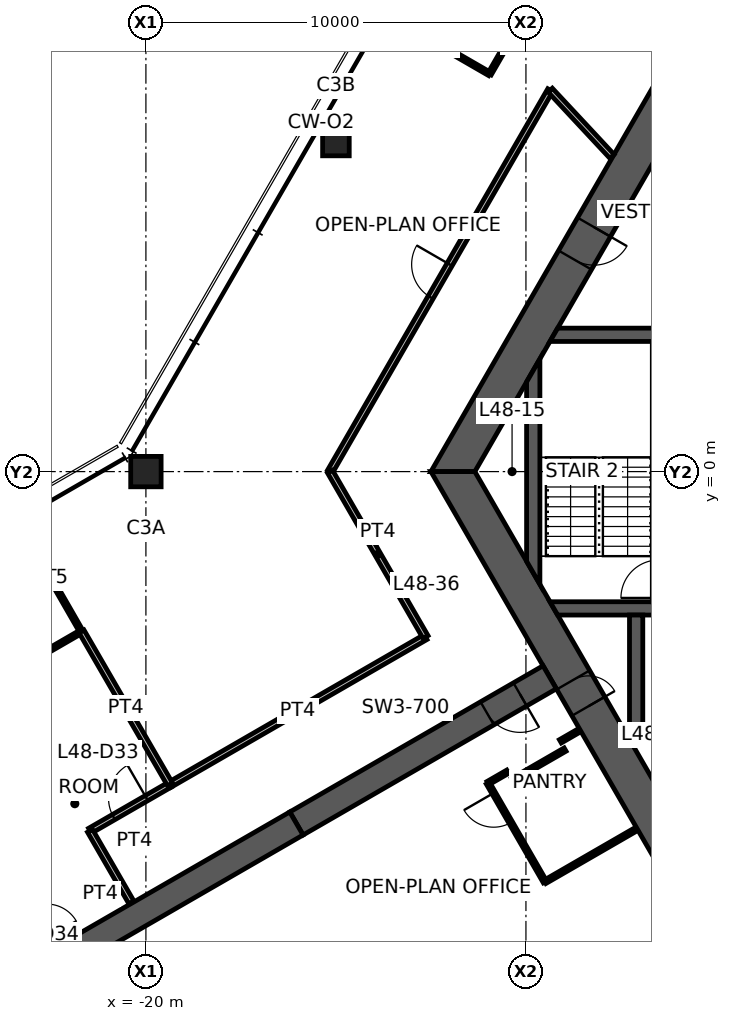
"""IFC4 building model, lengths in metres.
Left out: names, types, materials, properties, quantities, classifications, styles, units other than length and angle.
Written with IfcOpenShell. Run it as: python <this file> out.ifc"""

import sys

from ifc_helpers import new_model, si_unit, direction, frame, frame_2d, origin, origin_2d, place, context, subcontext, project, spatial, polyline, rectangle, hollow_rectangle, outline, extrude, element, fill, save


model = new_model("IFC4")
c1 = context("Model", 3, precision=1e-05, world=origin(), true_north=direction((0.0, 1.0)))
c2 = subcontext(c1, "Body", "Model", "MODEL_VIEW")
j1 = project(units=[si_unit("LENGTHUNIT", "METRE"), si_unit("PLANEANGLEUNIT", "RADIAN")], contexts=[c1])
p1 = place(None, origin())
s1 = spatial("IfcSite", under=j1, at=p1, CompositionType="ELEMENT")
p2 = place(p1, origin())
s2 = spatial("IfcBuilding", under=s1, at=p2, CompositionType="ELEMENT")
p3 = place(p2, frame((0.0, 0.0, 191.6)))
s3 = spatial("IfcBuildingStorey", under=s2, at=p3, CompositionType="ELEMENT", Elevation=191.6)
p4 = place(p3, frame((-20.0, 0.0, 0.0), z_axis=(0.0, 0.0, 1.0), x_axis=(1.0, 0.0, 0.0)))
e1 = element("IfcColumn", 1, at=p4, inside=s3, PredefinedType="COLUMN", context=c2, shape_type="SweptSolid", body=[
    extrude(hollow_rectangle(XDim=0.8, YDim=0.8, WallThickness=0.045, at=origin_2d()), origin(), (0.0, 0.0, 1.0), 3.9),
])
p5 = place(p3, frame((-15.0, 8.66, 0.0), z_axis=(0.0, 0.0, 1.0), x_axis=(1.0, 0.0, 0.0)))
e2 = element("IfcColumn", 2, at=p5, inside=s3, PredefinedType="COLUMN", context=c2, shape_type="SweptSolid", body=[
    extrude(hollow_rectangle(XDim=0.7, YDim=0.7, WallThickness=0.036, at=origin_2d()), origin(), (0.0, 0.0, 1.0), 3.9),
])
p6 = place(p3, frame((-5.961, 10.325, 0.0), z_axis=(0.0, 0.0, 1.0), x_axis=(-0.500004296715, -0.866022923061, 0.0)))
e3 = element("IfcWall", 3, at=p6, inside=s3, PredefinedType="SHEAR", context=c2, shape_type="SweptSolid", body=[
    extrude(outline(polyline([(-0.289, -0.5), (4.494, -0.5), (5.494, -0.5), (12.211, -0.5), (11.634, 0.5), (5.494, 0.5), (4.494, 0.5), (0.289, 0.5), (-0.289, -0.5)])), origin(), (0.0, 0.0, 1.0), 3.9),
])
p7 = place(p6, frame((4.494, 0.0, 0.0)))
e4 = element("IfcOpeningElement", 4, at=p7, cuts=e3, PredefinedType="OPENING", context=c2, shape_type="SweptSolid", body=[
    extrude(rectangle(XDim=1.0, YDim=2.1, at=frame_2d((0.5, 1.05))), frame((0.0, 0.51, 0.0), z_axis=(0.0, -1.0, 0.0), x_axis=(1.0, 0.0, 0.0)), (0.0, 0.0, 1.0), 1.02),
])
p8 = place(p3, frame((-11.922, 0.0, 0.0), z_axis=(0.0, 0.0, 1.0), x_axis=(0.500004296715, -0.866022923061, 0.0)))
e5 = element("IfcWall", 5, at=p8, inside=s3, PredefinedType="SHEAR", context=c2, shape_type="SweptSolid", body=[
    extrude(outline(polyline([(-0.289, -0.5), (6.331, -0.5), (7.131, -0.5), (12.211, -0.5), (11.634, 0.5), (7.131, 0.5), (6.331, 0.5), (0.289, 0.5), (-0.289, -0.5)])), origin(), (0.0, 0.0, 1.0), 3.9),
])
p9 = place(p8, frame((6.331, 0.0, 0.0)))
e6 = element("IfcOpeningElement", 6, at=p9, cuts=e5, PredefinedType="OPENING", context=c2, shape_type="SweptSolid", body=[
    extrude(rectangle(XDim=0.8, YDim=2.1, at=frame_2d((0.4, 1.05))), frame((0.0, 0.51, 0.0), z_axis=(0.0, -1.0, 0.0), x_axis=(1.0, 0.0, 0.0)), (0.0, 0.0, 1.0), 1.02),
])
p10 = place(p3, frame((-9.375, -5.413, 0.0), z_axis=(0.0, 0.0, 1.0), x_axis=(-0.866032377459, -0.499987921047, 0.0)))
e7 = element("IfcWall", 7, at=p10, inside=s3, PredefinedType="SHEAR", context=c2, shape_type="SweptSolid", body=[
    extrude(rectangle(XDim=7.696, YDim=0.7, at=frame_2d((3.848, 0.0))), origin(), (0.0, 0.0, 1.0), 3.9),
])
p11 = place(p10, frame((0.9, 0.0, 0.0)))
e8 = element("IfcOpeningElement", 8, at=p11, cuts=e7, PredefinedType="OPENING", context=c2, shape_type="SweptSolid", body=[
    extrude(rectangle(XDim=1.0, YDim=2.1, at=frame_2d((0.5, 1.05))), frame((0.0, 0.36, 0.0), z_axis=(0.0, -1.0, 0.0), x_axis=(1.0, 0.0, 0.0)), (0.0, 0.0, 1.0), 0.72),
])
p12 = place(p3, frame((-16.039, -9.26, 0.0), z_axis=(0.0, 0.0, 1.0), x_axis=(-0.866024837091, -0.50000098154, 0.0)))
e9 = element("IfcWall", 9, at=p12, inside=s3, PredefinedType="SHEAR", context=c2, shape_type="SweptSolid", body=[
    extrude(rectangle(XDim=13.0, YDim=0.7, at=frame_2d((6.5, 0.0))), origin(), (0.0, 0.0, 1.0), 3.9),
])
p13 = place(p3, frame((-9.266, 3.6, 0.0), z_axis=(0.0, 0.0, 1.0), x_axis=(1.0, 0.0, 0.0)))
e10 = element("IfcWall", 10, at=p13, inside=s3, PredefinedType="SHEAR", context=c2, shape_type="SweptSolid", body=[
    extrude(outline(polyline([(-0.101, -0.175), (3.266, -0.175), (4.266, -0.175), (5.667, -0.175), (6.767, -0.175), (7.841, -0.175), (7.841, 0.175), (6.767, 0.175), (5.667, 0.175), (4.266, 0.175), (3.266, 0.175), (0.101, 0.175), (-0.101, -0.175)])), origin(), (0.0, 0.0, 1.0), 3.9),
])
p14 = place(p13, frame((3.266, 0.0, 0.0)))
e11 = element("IfcOpeningElement", 11, at=p14, cuts=e10, PredefinedType="OPENING", context=c2, shape_type="SweptSolid", body=[
    extrude(rectangle(XDim=1.0, YDim=2.1, at=frame_2d((0.5, 1.05))), frame((0.0, 0.185, 0.0), z_axis=(0.0, -1.0, 0.0), x_axis=(1.0, 0.0, 0.0)), (0.0, 0.0, 1.0), 0.37),
])
p15 = place(p13, frame((5.667, 0.0, 0.0)))
e12 = element("IfcOpeningElement", 12, at=p15, cuts=e10, PredefinedType="OPENING", context=c2, shape_type="SweptSolid", body=[
    extrude(rectangle(XDim=1.1, YDim=2.1, at=frame_2d((0.55, 1.05))), frame((0.0, 0.185, 0.0), z_axis=(0.0, -1.0, 0.0), x_axis=(1.0, 0.0, 0.0)), (0.0, 0.0, 1.0), 0.37),
])
p16 = place(p3, frame((-9.266, -3.6, 0.0), z_axis=(0.0, 0.0, 1.0), x_axis=(1.0, 0.0, 0.0)))
e13 = element("IfcWall", 13, at=p16, inside=s3, PredefinedType="SHEAR", context=c2, shape_type="SweptSolid", body=[
    extrude(outline(polyline([(0.101, -0.175), (3.116, -0.175), (4.417, -0.175), (5.667, -0.175), (6.767, -0.175), (7.841, -0.175), (7.841, 0.175), (6.767, 0.175), (5.667, 0.175), (4.417, 0.175), (3.116, 0.175), (-0.101, 0.175), (0.101, -0.175)])), origin(), (0.0, 0.0, 1.0), 3.9),
])
p17 = place(p16, frame((5.667, 0.0, 0.0)))
e14 = element("IfcOpeningElement", 14, at=p17, cuts=e13, PredefinedType="OPENING", context=c2, shape_type="SweptSolid", body=[
    extrude(rectangle(XDim=1.1, YDim=2.1, at=frame_2d((0.55, 1.05))), frame((0.0, 0.185, 0.0), z_axis=(0.0, -1.0, 0.0), x_axis=(1.0, 0.0, 0.0)), (0.0, 0.0, 1.0), 0.37),
])
p18 = place(p16, frame((3.116, 0.0, 0.0)))
e15 = element("IfcOpeningElement", 15, at=p18, cuts=e13, PredefinedType="OPENING", context=c2, shape_type="SweptSolid", body=[
    extrude(rectangle(XDim=1.3, YDim=2.1, at=frame_2d((0.65, 1.05))), frame((0.0, 0.185, 0.0), z_axis=(0.0, -1.0, 0.0), x_axis=(1.0, 0.0, 0.0)), (0.0, 0.0, 1.0), 0.37),
])
p19 = place(p3, frame((-6.925, -7.0, 0.0), z_axis=(0.0, 0.0, 1.0), x_axis=(1.0, 0.0, 0.0)))
e16 = element("IfcWall", 16, at=p19, inside=s3, PredefinedType="SHEAR", context=c2, shape_type="SweptSolid", body=[
    extrude(rectangle(XDim=2.25, YDim=0.35, at=frame_2d((1.125, 0.0))), origin(), (0.0, 0.0, 1.0), 3.9),
])
p20 = place(p3, frame((-7.1, -3.775, 0.0), z_axis=(0.0, 0.0, 1.0), x_axis=(0.0, -1.0, 0.0)))
e17 = element("IfcWall", 17, at=p20, inside=s3, PredefinedType="SHEAR", context=c2, shape_type="SweptSolid", body=[
    extrude(outline(polyline([(0.0, -0.175), (3.274, -0.175), (3.4, 0.0), (3.4, 0.175), (0.0, 0.175), (0.0, -0.175)])), origin(), (0.0, 0.0, 1.0), 3.9),
])
p21 = place(p3, frame((-9.808, -2.662, 0.0), z_axis=(0.0, 0.0, 1.0), x_axis=(0.0, 1.0, 0.0)))
e18 = element("IfcWall", 18, at=p21, inside=s3, PredefinedType="SHEAR", context=c2, shape_type="SweptSolid", body=[
    extrude(outline(polyline([(-0.303, -0.175), (5.628, -0.175), (5.021, 0.175), (0.303, 0.175), (-0.303, -0.175)])), origin(), (0.0, 0.0, 1.0), 3.9),
])
p22 = place(p3, frame((-19.372, -8.24, 0.0), z_axis=(0.0, 0.0, 1.0), x_axis=(0.866015031168, 0.500017965468, 0.0)))
e19 = element("IfcWall", 19, at=p22, inside=s3, PredefinedType="PARTITIONING", context=c2, shape_type="SweptSolid", body=[
    extrude(rectangle(XDim=7.771, YDim=0.15, at=frame_2d((3.886, 0.0))), origin(), (0.0, 0.0, 1.0), 2.95),
])
p23 = place(p3, frame((-15.156, 0.0, 0.0), z_axis=(0.0, 0.0, 1.0), x_axis=(0.500012970505, 0.86601791513, 0.0)))
e20 = element("IfcWall", 20, at=p23, inside=s3, PredefinedType="PARTITIONING", context=c2, shape_type="SweptSolid", body=[
    extrude(rectangle(XDim=11.591, YDim=0.15, at=frame_2d((5.795, 0.0))), origin(), (0.0, 0.0, 1.0), 2.95),
])
p24 = place(p23, frame((5.295, 0.0, 0.0)))
e21 = element("IfcOpeningElement", 21, at=p24, cuts=e20, PredefinedType="OPENING", context=c2, shape_type="SweptSolid", body=[
    extrude(rectangle(XDim=1.0, YDim=2.1, at=frame_2d((0.5, 1.05))), frame((0.0, 0.085, 0.0), z_axis=(0.0, -1.0, 0.0), x_axis=(1.0, 0.0, 0.0)), (0.0, 0.0, 1.0), 0.17),
])
p25 = place(p3, frame((-12.642, -4.354, 0.0), z_axis=(0.0, 0.0, 1.0), x_axis=(-0.500019495363, 0.866014147839, 0.0)))
e22 = element("IfcWall", 22, at=p25, inside=s3, PredefinedType="PARTITIONING", context=c2, shape_type="SweptSolid", body=[
    extrude(rectangle(XDim=5.028, YDim=0.15, at=frame_2d((2.514, 0.0))), origin(), (0.0, 0.0, 1.0), 2.95),
])
p26 = place(p3, frame((-9.36, 10.038, 0.0), z_axis=(0.0, 0.0, 1.0), x_axis=(0.681997114248, -0.731354863358, 0.0)))
e23 = element("IfcWall", 23, at=p26, inside=s3, PredefinedType="PARTITIONING", context=c2, shape_type="SweptSolid", body=[
    extrude(outline(polyline([(0.0, -0.075), (2.384, -0.075), (2.384, 0.0), (2.382, 0.075), (0.0, 0.075), (0.0, -0.075)])), origin(), (0.0, 0.0, 1.0), 2.95),
])
p27 = place(p3, frame((-21.471, -9.452, 0.0), z_axis=(0.0, 0.0, 1.0), x_axis=(0.866025270247, 0.500000231294, 0.0)))
e24 = element("IfcWall", 24, at=p27, inside=s3, PredefinedType="PARTITIONING", context=c2, shape_type="SweptSolid", body=[
    extrude(rectangle(XDim=2.435, YDim=0.15, at=frame_2d((1.217, 0.0))), origin(), (0.0, 0.0, 1.0), 2.95),
])
p28 = place(p27, frame((0.717, 0.0, 0.0)))
e25 = element("IfcOpeningElement", 25, at=p28, cuts=e24, PredefinedType="OPENING", context=c2, shape_type="SweptSolid", body=[
    extrude(rectangle(XDim=1.0, YDim=2.1, at=frame_2d((0.5, 1.05))), frame((0.0, 0.085, 0.0), z_axis=(0.0, -1.0, 0.0), x_axis=(1.0, 0.0, 0.0)), (0.0, 0.0, 1.0), 0.17),
])
p29 = place(p3, frame((-20.381, -11.34, 0.0), z_axis=(0.0, 0.0, 1.0), x_axis=(-0.500029427677, 0.866008413041, 0.0)))
e26 = element("IfcWall", 26, at=p29, inside=s3, PredefinedType="PARTITIONING", context=c2, shape_type="SweptSolid", body=[
    extrude(rectangle(XDim=2.18, YDim=0.15, at=frame_2d((1.09, 0.0))), origin(), (0.0, 0.0, 1.0), 2.95),
])
p30 = place(p3, frame((-25.878, -6.627, 0.0), z_axis=(0.0, 0.0, 1.0), x_axis=(0.500502111965, -0.865735315162, 0.0)))
e27 = element("IfcWall", 27, at=p30, inside=s3, PredefinedType="PARTITIONING", context=c2, shape_type="SweptSolid", body=[
    extrude(rectangle(XDim=6.83, YDim=0.1, at=frame_2d((3.415, 0.0))), origin(), (0.0, 0.0, 1.0), 2.95),
])
p31 = place(p30, frame((5.63, 0.0, 0.0)))
e28 = element("IfcOpeningElement", 28, at=p31, cuts=e27, PredefinedType="OPENING", context=c2, shape_type="SweptSolid", body=[
    extrude(rectangle(XDim=0.9, YDim=2.1, at=frame_2d((0.45, 1.05))), frame((0.0, 0.06, 0.0), z_axis=(0.0, -1.0, 0.0), x_axis=(1.0, 0.0, 0.0)), (0.0, 0.0, 1.0), 0.12),
])
p32 = place(p3, frame((-23.332, -1.37, 0.0), z_axis=(0.0, 0.0, 1.0), x_axis=(0.498789948492, -0.866722901095, 0.0)))
e29 = element("IfcWall", 29, at=p32, inside=s3, PredefinedType="PARTITIONING", context=c2, shape_type="SweptSolid", body=[
    extrude(rectangle(XDim=3.28, YDim=0.1, at=frame_2d((1.64, 0.0))), origin(), (0.0, 0.0, 1.0), 2.95),
])
p33 = place(p3, frame((-21.695, -4.206, 0.0), z_axis=(0.0, 0.0, 1.0), x_axis=(-0.865554211136, -0.500815242963, 0.0)))
e30 = element("IfcWall", 30, at=p33, inside=s3, PredefinedType="PARTITIONING", context=c2, shape_type="SweptSolid", body=[
    extrude(rectangle(XDim=4.833, YDim=0.1, at=frame_2d((2.417, 0.0))), origin(), (0.0, 0.0, 1.0), 2.95),
])
p34 = place(p33, frame((3.633, 0.0, 0.0)))
e31 = element("IfcOpeningElement", 31, at=p34, cuts=e30, PredefinedType="OPENING", context=c2, shape_type="SweptSolid", body=[
    extrude(rectangle(XDim=0.9, YDim=2.1, at=frame_2d((0.45, 1.05))), frame((0.0, 0.06, 0.0), z_axis=(0.0, -1.0, 0.0), x_axis=(1.0, 0.0, 0.0)), (0.0, 0.0, 1.0), 0.12),
])
p35 = place(p3, frame((-10.956, 10.465, 0.0), z_axis=(0.0, 0.0, 1.0), x_axis=(-0.866044340336, 0.499967199496, 0.0)))
e32 = element("IfcWall", 32, at=p35, inside=s3, PredefinedType="PARTITIONING", context=c2, shape_type="SweptSolid", body=[
    extrude(rectangle(XDim=3.08, YDim=0.1, at=frame_2d((1.54, 0.0))), origin(), (0.0, 0.0, 1.0), 2.95),
])
p36 = place(p3, frame((-9.291, 13.349, 0.0), z_axis=(0.0, 0.0, 1.0), x_axis=(-0.500033344505, -0.86600615147, 0.0)))
e33 = element("IfcWall", 33, at=p36, inside=s3, PredefinedType="PARTITIONING", context=c2, shape_type="SweptSolid", body=[
    extrude(rectangle(XDim=3.331, YDim=0.1, at=frame_2d((1.666, 0.0))), origin(), (0.0, 0.0, 1.0), 2.95),
])
p37 = place(p36, frame((0.3, 0.0, 0.0)))
e34 = element("IfcOpeningElement", 34, at=p37, cuts=e33, PredefinedType="OPENING", context=c2, shape_type="SweptSolid", body=[
    extrude(rectangle(XDim=0.9, YDim=2.1, at=frame_2d((0.45, 1.05))), frame((0.0, 0.06, 0.0), z_axis=(0.0, -1.0, 0.0), x_axis=(1.0, 0.0, 0.0)), (0.0, 0.0, 1.0), 0.12),
])
p38 = place(p3, frame((-19.363, -8.234, 0.0), z_axis=(0.0, 0.0, 1.0), x_axis=(-0.500877035324, 0.865518454734, 0.0)))
e35 = element("IfcWall", 35, at=p38, inside=s3, PredefinedType="PARTITIONING", context=c2, shape_type="SweptSolid", body=[
    extrude(rectangle(XDim=4.654, YDim=0.15, at=frame_2d((2.327, 0.0))), origin(), (0.0, 0.0, 1.0), 2.95),
])
p39 = place(p3, frame((-11.0, -8.198, 0.0), z_axis=(0.0, 0.0, 1.0), x_axis=(0.866131372301, 0.499816412211, 0.0)))
e36 = element("IfcWall", 36, at=p39, inside=s3, PredefinedType="PARTITIONING", context=c2, shape_type="SweptSolid", body=[
    extrude(rectangle(XDim=0.6, YDim=0.1, at=frame_2d((0.3, 0.0))), origin(), (0.0, 0.0, 1.0), 2.95),
])
p40 = place(p3, frame((-10.355, -8.115, 0.0), z_axis=(0.0, 0.0, 1.0), x_axis=(0.866094119867, 0.499880961361, 0.0)))
e37 = element("IfcWall", 37, at=p40, inside=s3, PredefinedType="PARTITIONING", context=c2, shape_type="SweptSolid", body=[
    extrude(rectangle(XDim=1.6, YDim=0.1, at=frame_2d((0.8, 0.0))), origin(), (0.0, 0.0, 1.0), 2.95),
])
p41 = place(p3, frame((-9.5, -10.796, 0.0), z_axis=(0.0, 0.0, 1.0), x_axis=(-0.499990139034, 0.866031096941, 0.0)))
e38 = element("IfcWall", 38, at=p41, inside=s3, PredefinedType="PARTITIONING", context=c2, shape_type="SweptSolid", body=[
    extrude(rectangle(XDim=3.0, YDim=0.1, at=frame_2d((1.5, 0.0))), origin(), (0.0, 0.0, 1.0), 2.95),
])
p42 = place(p41, frame((1.8, 0.0, 0.0)))
e39 = element("IfcOpeningElement", 39, at=p42, cuts=e38, PredefinedType="OPENING", context=c2, shape_type="SweptSolid", body=[
    extrude(rectangle(XDim=0.9, YDim=2.1, at=frame_2d((0.45, 1.05))), frame((0.0, 0.06, 0.0), z_axis=(0.0, -1.0, 0.0), x_axis=(1.0, 0.0, 0.0)), (0.0, 0.0, 1.0), 0.12),
])
p43 = place(p3, frame((-9.094, -7.098, 0.0), z_axis=(0.0, 0.0, 1.0), x_axis=(0.865954211699, 0.50012328804, 0.0)))
e40 = element("IfcWall", 40, at=p43, inside=s3, PredefinedType="PARTITIONING", context=c2, shape_type="SweptSolid", body=[
    extrude(rectangle(XDim=0.58, YDim=0.1, at=frame_2d((0.29, 0.0))), origin(), (0.0, 0.0, 1.0), 2.95),
])
p44 = place(p3, frame((-7.092, -9.406, 0.0), z_axis=(0.0, 0.0, 1.0), x_axis=(-0.86603494908, -0.499983466698, 0.0)))
e41 = element("IfcWall", 41, at=p44, inside=s3, PredefinedType="PARTITIONING", context=c2, shape_type="SweptSolid", body=[
    extrude(rectangle(XDim=2.78, YDim=0.1, at=frame_2d((1.39, 0.0))), origin(), (0.0, 0.0, 1.0), 2.95),
])
p45 = place(p9, origin())
e42 = element("IfcDoor", 42, at=p45, inside=s3, OperationType="SINGLE_SWING_RIGHT", PredefinedType="DOOR", context=c2, shape_type="SweptSolid", body=[
    extrude(rectangle(XDim=0.8, YDim=2.1, at=frame_2d((0.4, 1.05))), frame((0.0, 0.025, 0.0), z_axis=(0.0, -1.0, 0.0), x_axis=(1.0, 0.0, 0.0)), (0.0, 0.0, 1.0), 0.05),
])
fill(e6, e42)
p46 = place(p7, origin())
e43 = element("IfcDoor", 43, at=p46, inside=s3, OperationType="SINGLE_SWING_LEFT", PredefinedType="DOOR", context=c2, shape_type="SweptSolid", body=[
    extrude(rectangle(XDim=1.0, YDim=2.1, at=frame_2d((0.5, 1.05))), frame((0.0, 0.025, 0.0), z_axis=(0.0, -1.0, 0.0), x_axis=(1.0, 0.0, 0.0)), (0.0, 0.0, 1.0), 0.05),
])
fill(e4, e43)
p47 = place(p11, origin())
e44 = element("IfcDoor", 44, at=p47, inside=s3, OperationType="SINGLE_SWING_LEFT", PredefinedType="DOOR", context=c2, shape_type="SweptSolid", body=[
    extrude(rectangle(XDim=1.0, YDim=2.1, at=frame_2d((0.5, 1.05))), frame((0.0, 0.025, 0.0), z_axis=(0.0, -1.0, 0.0), x_axis=(1.0, 0.0, 0.0)), (0.0, 0.0, 1.0), 0.05),
])
fill(e8, e44)
p48 = place(p24, origin())
e45 = element("IfcDoor", 45, at=p48, inside=s3, OperationType="SINGLE_SWING_RIGHT", PredefinedType="DOOR", context=c2, shape_type="SweptSolid", body=[
    extrude(rectangle(XDim=1.0, YDim=2.1, at=frame_2d((0.5, 1.05))), frame((0.0, 0.025, 0.0), z_axis=(0.0, -1.0, 0.0), x_axis=(1.0, 0.0, 0.0)), (0.0, 0.0, 1.0), 0.05),
])
fill(e21, e45)
p49 = place(p28, origin())
e46 = element("IfcDoor", 46, at=p49, inside=s3, OperationType="SINGLE_SWING_RIGHT", PredefinedType="DOOR", context=c2, shape_type="SweptSolid", body=[
    extrude(rectangle(XDim=1.0, YDim=2.1, at=frame_2d((0.5, 1.05))), frame((0.0, 0.025, 0.0), z_axis=(0.0, -1.0, 0.0), x_axis=(1.0, 0.0, 0.0)), (0.0, 0.0, 1.0), 0.05),
])
fill(e25, e46)
p50 = place(p42, origin())
e47 = element("IfcDoor", 47, at=p50, inside=s3, OperationType="SINGLE_SWING_RIGHT", PredefinedType="DOOR", context=c2, shape_type="SweptSolid", body=[
    extrude(rectangle(XDim=0.9, YDim=2.1, at=frame_2d((0.45, 1.05))), frame((0.0, 0.025, 0.0), z_axis=(0.0, -1.0, 0.0), x_axis=(1.0, 0.0, 0.0)), (0.0, 0.0, 1.0), 0.05),
])
fill(e39, e47)
save(model, sys.argv[1])
